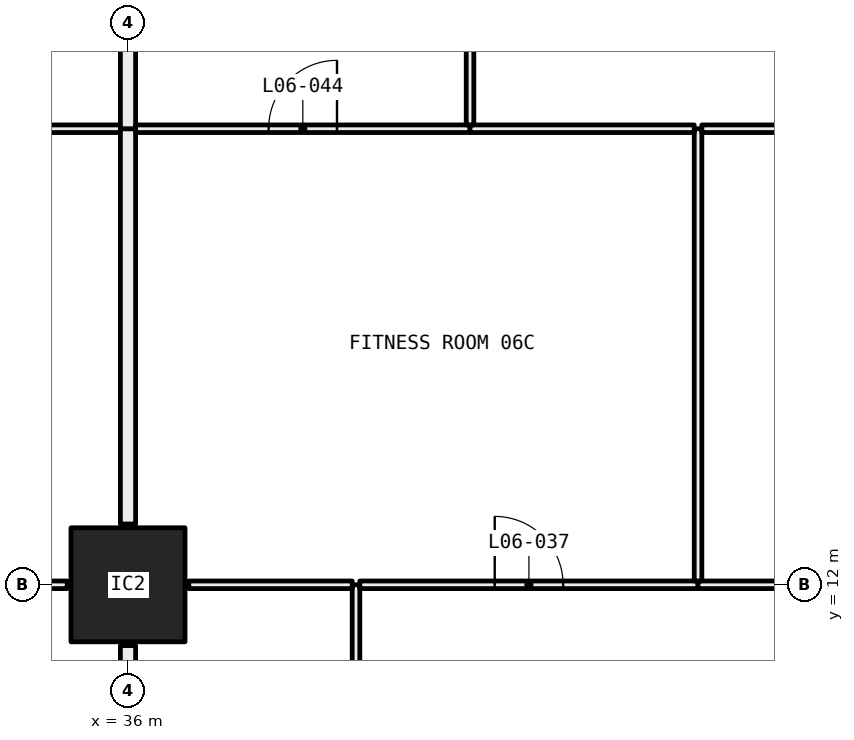
"""IFC4 building model, lengths in metres.
Left out: names, types, materials, properties, quantities, classifications, styles, units other than length and angle.
Written with IfcOpenShell. Run it as: python <this file> out.ifc"""

import sys

from ifc_helpers import new_model, si_unit, direction, frame, frame_2d, origin, origin_2d, place, context, subcontext, project, spatial, rectangle, hollow_rectangle, extrude, element, fill, save


model = new_model("IFC4")
c1 = context("Model", 3, precision=1e-05, world=origin(), true_north=direction((0.0, 1.0)))
c2 = subcontext(c1, "Body", "Model", "MODEL_VIEW")
j1 = project(units=[si_unit("LENGTHUNIT", "METRE"), si_unit("PLANEANGLEUNIT", "RADIAN")], contexts=[c1])
p1 = place(None, origin())
s1 = spatial("IfcSite", under=j1, at=p1, CompositionType="ELEMENT")
p2 = place(p1, origin())
s2 = spatial("IfcBuilding", under=s1, at=p2, CompositionType="ELEMENT")
p3 = place(p2, frame((0.0, 0.0, 33.45)))
s3 = spatial("IfcBuildingStorey", under=s2, at=p3, CompositionType="ELEMENT", Elevation=33.45)
p4 = place(p3, frame((36.0, 12.0, 0.0), z_axis=(0.0, 0.0, 1.0), x_axis=(1.0, 0.0, 0.0)))
e1 = element("IfcColumn", 1, at=p4, inside=s3, PredefinedType="COLUMN", context=c2, shape_type="SweptSolid", body=[
    extrude(hollow_rectangle(XDim=1.5, YDim=1.5, WallThickness=0.065, at=origin_2d()), origin(), (0.0, 0.0, 1.0), 3.05),
])
p5 = place(p3, frame((35.2, 12.0, 0.0), z_axis=(0.0, 0.0, 1.0), x_axis=(-1.0, 0.0, 0.0)))
e2 = element("IfcWall", 2, at=p5, inside=s3, PredefinedType="PARTITIONING", context=c2, shape_type="SweptSolid", body=[
    extrude(rectangle(XDim=2.15, YDim=0.1, at=frame_2d((1.075, 0.0))), origin(), (0.0, 0.0, 1.0), 2.45),
])
p6 = place(p3, frame((36.0, 6.0, 0.0), z_axis=(0.0, 0.0, 1.0), x_axis=(0.0, 1.0, 0.0)))
e3 = element("IfcWall", 3, at=p6, inside=s3, PredefinedType="PARTITIONING", context=c2, shape_type="SweptSolid", body=[
    extrude(rectangle(XDim=5.2, YDim=0.2, at=frame_2d((2.6, 0.0))), origin(), (0.0, 0.0, 1.0), 2.45),
])
p7 = place(p3, frame((35.9, 18.0, 0.0), z_axis=(0.0, 0.0, 1.0), x_axis=(-1.0, 0.0, 0.0)))
e4 = element("IfcWall", 4, at=p7, inside=s3, PredefinedType="PARTITIONING", context=c2, shape_type="SweptSolid", body=[
    extrude(rectangle(XDim=4.4, YDim=0.1, at=frame_2d((2.2, 0.0))), origin(), (0.0, 0.0, 1.0), 3.05),
])
for number, where, z_axis, x_axis in (
    (5, (36.0, 12.8, 0.0), (0.0, 0.0, 1.0), (0.0, 1.0, 0.0)),
    (6, (36.0, 18.0, 0.0), (0.0, 0.0, 1.0), (0.0, 1.0, 0.0)),
):
    element("IfcWall", number, at=place(p3, frame(where, z_axis=z_axis, x_axis=x_axis)), inside=s3, PredefinedType="PARTITIONING", context=c2, shape_type="SweptSolid", body=[
        extrude(rectangle(XDim=5.2, YDim=0.2, at=frame_2d((2.6, 0.0))), origin(), (0.0, 0.0, 1.0), 2.45),
    ])
p8 = place(p3, frame((39.0, 6.05, 0.0), z_axis=(0.0, 0.0, 1.0), x_axis=(0.0, 1.0, 0.0)))
e7 = element("IfcWall", 7, at=p8, inside=s3, PredefinedType="PARTITIONING", context=c2, shape_type="SweptSolid", body=[
    extrude(rectangle(XDim=5.95, YDim=0.1, at=frame_2d((2.975, 0.0))), origin(), (0.0, 0.0, 1.0), 2.45),
])
p9 = place(p8, frame((2.525, 0.0, 0.0)))
e8 = element("IfcOpeningElement", 8, at=p9, cuts=e7, PredefinedType="OPENING", context=c2, shape_type="SweptSolid", body=[
    extrude(rectangle(XDim=0.9, YDim=2.1, at=frame_2d((0.45, 1.05))), frame((0.0, 0.06, 0.0), z_axis=(0.0, -1.0, 0.0), x_axis=(1.0, 0.0, 0.0)), (0.0, 0.0, 1.0), 0.12),
])
p10 = place(p3, frame((38.95, 12.0, 0.0), z_axis=(0.0, 0.0, 1.0), x_axis=(-1.0, 0.0, 0.0)))
e9 = element("IfcWall", 9, at=p10, inside=s3, PredefinedType="PARTITIONING", context=c2, shape_type="SweptSolid", body=[
    extrude(rectangle(XDim=2.15, YDim=0.1, at=frame_2d((1.075, 0.0))), origin(), (0.0, 0.0, 1.0), 2.45),
])
p11 = place(p3, frame((43.5, 12.0, 0.0), z_axis=(0.0, 0.0, 1.0), x_axis=(-1.0, 0.0, 0.0)))
e10 = element("IfcWall", 10, at=p11, inside=s3, PredefinedType="PARTITIONING", context=c2, shape_type="SweptSolid", body=[
    extrude(rectangle(XDim=4.45, YDim=0.1, at=frame_2d((2.225, 0.0))), origin(), (0.0, 0.0, 1.0), 2.45),
])
p12 = place(p11, frame((1.775, 0.0, 0.0)))
e11 = element("IfcOpeningElement", 11, at=p12, cuts=e10, PredefinedType="OPENING", context=c2, shape_type="SweptSolid", body=[
    extrude(rectangle(XDim=0.9, YDim=2.1, at=frame_2d((0.45, 1.05))), frame((0.0, 0.06, 0.0), z_axis=(0.0, -1.0, 0.0), x_axis=(1.0, 0.0, 0.0)), (0.0, 0.0, 1.0), 0.12),
])
p13 = place(p3, frame((47.02, 12.0, 0.0), z_axis=(0.0, 0.0, 1.0), x_axis=(-1.0, 0.0, 0.0)))
e12 = element("IfcWall", 12, at=p13, inside=s3, PredefinedType="PARTITIONING", context=c2, shape_type="SweptSolid", body=[
    extrude(rectangle(XDim=3.52, YDim=0.1, at=frame_2d((1.76, 0.0))), origin(), (0.0, 0.0, 1.0), 2.45),
])
p14 = place(p3, frame((43.5, 12.05, 0.0), z_axis=(0.0, 0.0, 1.0), x_axis=(0.0, 1.0, 0.0)))
e13 = element("IfcWall", 13, at=p14, inside=s3, PredefinedType="PARTITIONING", context=c2, shape_type="SweptSolid", body=[
    extrude(rectangle(XDim=5.95, YDim=0.1, at=frame_2d((2.975, 0.0))), origin(), (0.0, 0.0, 1.0), 2.45),
])
p15 = place(p3, frame((40.5, 18.0, 0.0), z_axis=(0.0, 0.0, 1.0), x_axis=(-1.0, 0.0, 0.0)))
e14 = element("IfcWall", 14, at=p15, inside=s3, PredefinedType="PARTITIONING", context=c2, shape_type="SweptSolid", body=[
    extrude(rectangle(XDim=4.4, YDim=0.1, at=frame_2d((2.2, 0.0))), origin(), (0.0, 0.0, 1.0), 3.05),
])
p16 = place(p15, frame((1.75, 0.0, 0.0)))
e15 = element("IfcOpeningElement", 15, at=p16, cuts=e14, PredefinedType="OPENING", context=c2, shape_type="SweptSolid", body=[
    extrude(rectangle(XDim=0.9, YDim=2.1, at=frame_2d((0.45, 1.05))), frame((0.0, 0.06, 0.0), z_axis=(0.0, -1.0, 0.0), x_axis=(1.0, 0.0, 0.0)), (0.0, 0.0, 1.0), 0.12),
])
p17 = place(p3, frame((43.45, 18.0, 0.0), z_axis=(0.0, 0.0, 1.0), x_axis=(-1.0, 0.0, 0.0)))
e16 = element("IfcWall", 16, at=p17, inside=s3, PredefinedType="PARTITIONING", context=c2, shape_type="SweptSolid", body=[
    extrude(rectangle(XDim=2.95, YDim=0.1, at=frame_2d((1.475, 0.0))), origin(), (0.0, 0.0, 1.0), 3.05),
])
p18 = place(p3, frame((46.0, 18.0, 0.0), z_axis=(0.0, 0.0, 1.0), x_axis=(-1.0, 0.0, 0.0)))
e17 = element("IfcWall", 17, at=p18, inside=s3, PredefinedType="PARTITIONING", context=c2, shape_type="SweptSolid", body=[
    extrude(rectangle(XDim=2.45, YDim=0.1, at=frame_2d((1.225, 0.0))), origin(), (0.0, 0.0, 1.0), 3.05),
])
p19 = place(p3, frame((40.5, 18.05, 0.0), z_axis=(0.0, 0.0, 1.0), x_axis=(0.0, 1.0, 0.0)))
e18 = element("IfcWall", 18, at=p19, inside=s3, PredefinedType="PARTITIONING", context=c2, shape_type="SweptSolid", body=[
    extrude(rectangle(XDim=6.175, YDim=0.1, at=frame_2d((3.087, 0.0))), origin(), (0.0, 0.0, 1.0), 2.45),
])
p20 = place(p19, frame((2.637, 0.0, 0.0)))
e19 = element("IfcOpeningElement", 19, at=p20, cuts=e18, PredefinedType="OPENING", context=c2, shape_type="SweptSolid", body=[
    extrude(rectangle(XDim=0.9, YDim=2.1, at=frame_2d((0.45, 1.05))), frame((0.0, 0.06, 0.0), z_axis=(0.0, -1.0, 0.0), x_axis=(1.0, 0.0, 0.0)), (0.0, 0.0, 1.0), 0.12),
])
p21 = place(p12, frame((0.9, 0.0, 0.0), x_axis=(-1.0, 0.0, 0.0)))
e20 = element("IfcDoor", 20, at=p21, inside=s3, OperationType="SINGLE_SWING_RIGHT", PredefinedType="DOOR", context=c2, shape_type="SweptSolid", body=[
    extrude(rectangle(XDim=0.9, YDim=2.1, at=frame_2d((0.45, 1.05))), frame((0.0, 0.025, 0.0), z_axis=(0.0, -1.0, 0.0), x_axis=(1.0, 0.0, 0.0)), (0.0, 0.0, 1.0), 0.05),
])
fill(e11, e20)
p22 = place(p16, frame((0.9, 0.0, 0.0), x_axis=(-1.0, 0.0, 0.0)))
e21 = element("IfcDoor", 21, at=p22, inside=s3, OperationType="SINGLE_SWING_LEFT", PredefinedType="DOOR", context=c2, shape_type="SweptSolid", body=[
    extrude(rectangle(XDim=0.9, YDim=2.1, at=frame_2d((0.45, 1.05))), frame((0.0, 0.025, 0.0), z_axis=(0.0, -1.0, 0.0), x_axis=(1.0, 0.0, 0.0)), (0.0, 0.0, 1.0), 0.05),
])
fill(e15, e21)
save(model, sys.argv[1])
